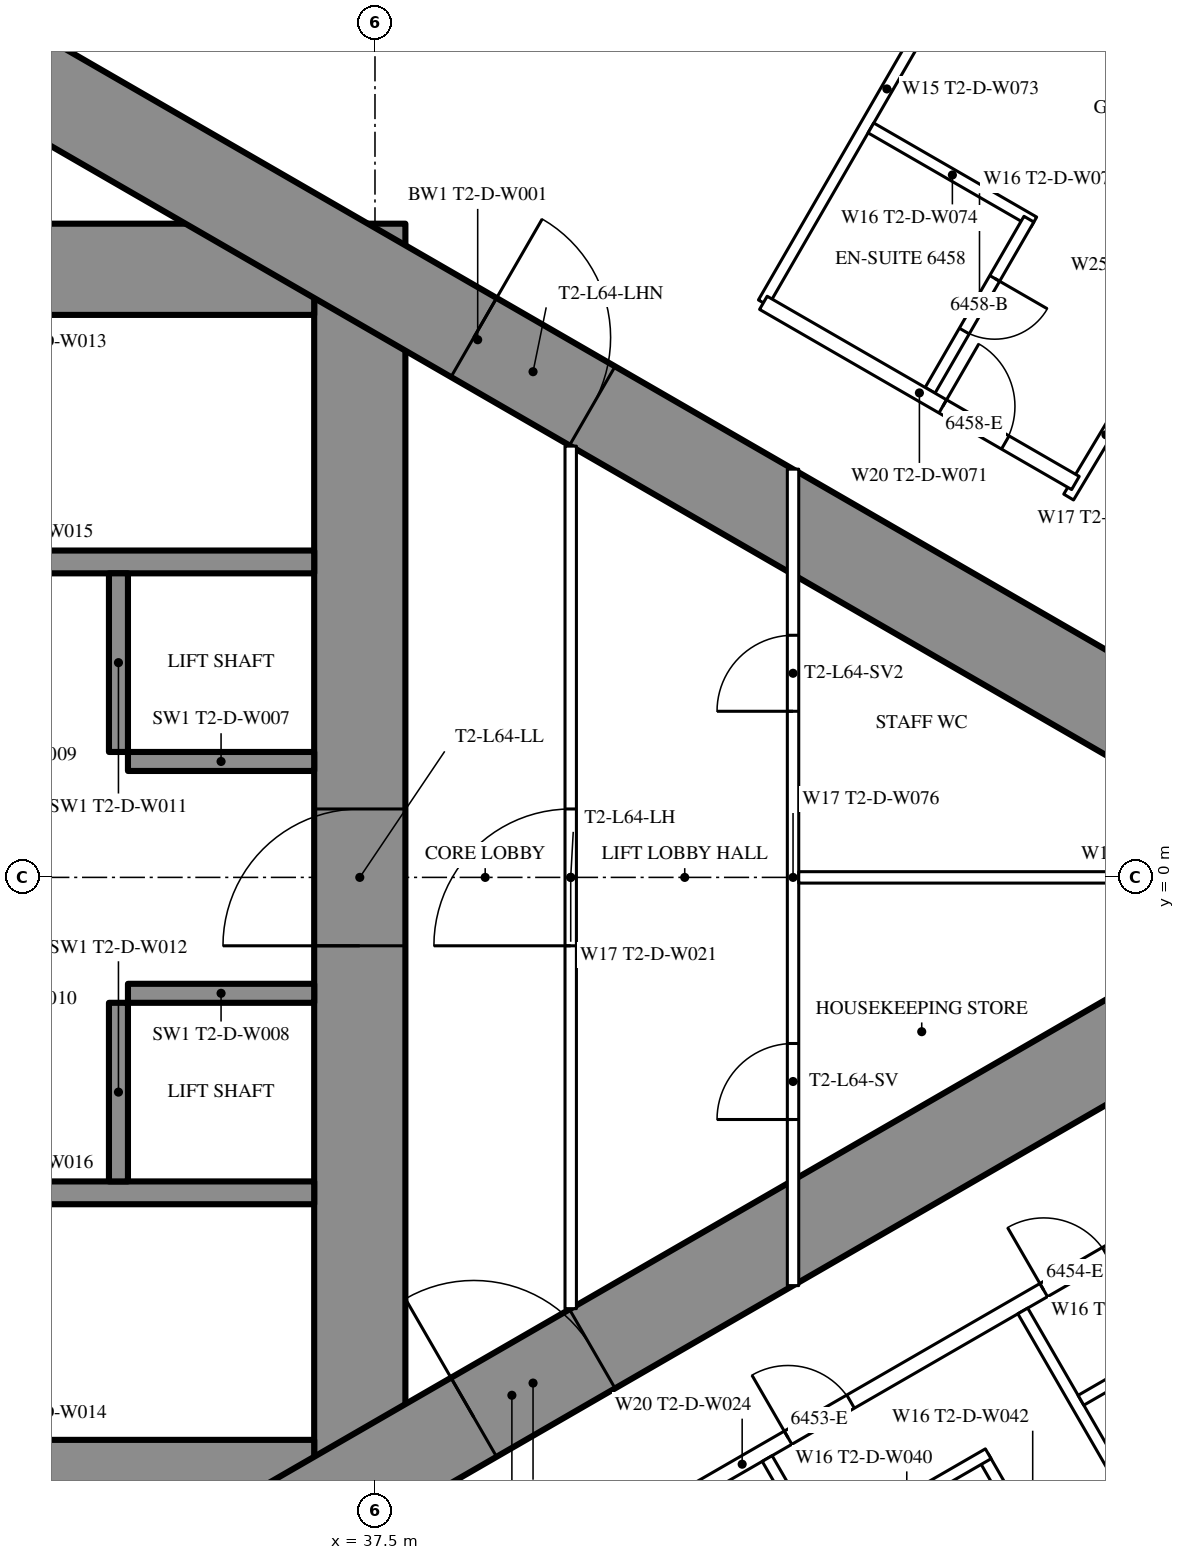
"""IFC4 building model, lengths in metres.
Left out: names, types, materials, properties, quantities, classifications, styles, units other than length and angle.
Written with IfcOpenShell. Run it as: python <this file> out.ifc"""

import sys

from ifc_helpers import new_model, si_unit, direction, frame, frame_2d, origin, place, context, subcontext, project, spatial, rectangle, extrude, element, fill, save


model = new_model("IFC4")
c1 = context("Model", 3, precision=1e-05, world=origin(), true_north=direction((0.0, 1.0)))
c2 = subcontext(c1, "Body", "Model", "MODEL_VIEW")
j1 = project(units=[si_unit("LENGTHUNIT", "METRE"), si_unit("PLANEANGLEUNIT", "RADIAN")], contexts=[c1])
p1 = place(None, origin())
s1 = spatial("IfcSite", under=j1, at=p1, CompositionType="ELEMENT")
p2 = place(p1, origin())
s2 = spatial("IfcBuilding", under=s1, at=p2, CompositionType="ELEMENT")
p3 = place(p2, frame((0.0, 0.0, 240.5)))
s3 = spatial("IfcBuildingStorey", under=s2, at=p3, CompositionType="ELEMENT", Elevation=240.5)
p4 = place(p3, frame((37.3, -8.6, 0.0), z_axis=(0.0, 0.0, 1.0), x_axis=(0.0, 1.0, 0.0)))
e1 = element("IfcWall", 1, at=p4, inside=s3, PredefinedType="SHEAR", context=c2, shape_type="SweptSolid", body=[
    extrude(rectangle(XDim=17.2, YDim=1.2, at=frame_2d((8.6, 0.0))), origin(), (0.0, 0.0, 1.0), 3.6),
])
p5 = place(p4, frame((7.7, 0.0, 0.0)))
e2 = element("IfcOpeningElement", 2, at=p5, cuts=e1, PredefinedType="OPENING", context=c2, shape_type="SweptSolid", body=[
    extrude(rectangle(XDim=1.8, YDim=2.2, at=frame_2d((0.9, 1.1))), frame((0.0, 0.61, 0.0), z_axis=(0.0, -1.0, 0.0), x_axis=(1.0, 0.0, 0.0)), (0.0, 0.0, 1.0), 1.22),
])
p6 = place(p3, frame((28.3, -8.0, 0.0), z_axis=(0.0, 0.0, 1.0), x_axis=(1.0, 0.0, 0.0)))
e3 = element("IfcWall", 3, at=p6, inside=s3, PredefinedType="SHEAR", context=c2, shape_type="SweptSolid", body=[
    extrude(rectangle(XDim=8.4, YDim=1.2, at=frame_2d((4.2, 0.0))), origin(), (0.0, 0.0, 1.0), 3.6),
])
p7 = place(p6, frame((0.25, 0.0, 0.0)))
e4 = element("IfcOpeningElement", 4, at=p7, cuts=e3, PredefinedType="OPENING", context=c2, shape_type="SweptSolid", body=[
    extrude(rectangle(XDim=1.0, YDim=2.2, at=frame_2d((0.5, 1.1))), frame((0.0, 0.61, 0.0), z_axis=(0.0, -1.0, 0.0), x_axis=(1.0, 0.0, 0.0)), (0.0, 0.0, 1.0), 1.22),
])
p8 = place(p3, frame((28.3, 8.0, 0.0), z_axis=(0.0, 0.0, 1.0), x_axis=(1.0, 0.0, 0.0)))
e5 = element("IfcWall", 5, at=p8, inside=s3, PredefinedType="SHEAR", context=c2, shape_type="SweptSolid", body=[
    extrude(rectangle(XDim=8.4, YDim=1.2, at=frame_2d((4.2, 0.0))), origin(), (0.0, 0.0, 1.0), 3.6),
])
p9 = place(p8, frame((0.25, 0.0, 0.0)))
e6 = element("IfcOpeningElement", 6, at=p9, cuts=e5, PredefinedType="OPENING", context=c2, shape_type="SweptSolid", body=[
    extrude(rectangle(XDim=1.0, YDim=2.2, at=frame_2d((0.5, 1.1))), frame((0.0, 0.61, 0.0), z_axis=(0.0, -1.0, 0.0), x_axis=(1.0, 0.0, 0.0)), (0.0, 0.0, 1.0), 1.22),
])
for number, where, z_axis, x_axis in (
    (7, (28.3, -4.15, 0.0), (0.0, 0.0, 1.0), (1.0, 0.0, 0.0)),
    (8, (28.3, 4.15, 0.0), (0.0, 0.0, 1.0), (1.0, 0.0, 0.0)),
):
    element("IfcWall", number, at=place(p3, frame(where, z_axis=z_axis, x_axis=x_axis)), inside=s3, PredefinedType="SHEAR", context=c2, shape_type="SweptSolid", body=[
        extrude(rectangle(XDim=8.4, YDim=0.3, at=frame_2d((4.2, 0.0))), origin(), (0.0, 0.0, 1.0), 3.6),
    ])
p10 = place(p3, frame((34.125, -4.0, 0.0), z_axis=(0.0, 0.0, 1.0), x_axis=(0.0, 1.0, 0.0)))
e9 = element("IfcWall", 9, at=p10, inside=s3, PredefinedType="SHEAR", context=c2, shape_type="SweptSolid", body=[
    extrude(rectangle(XDim=2.35, YDim=0.25, at=frame_2d((1.175, 0.0))), origin(), (0.0, 0.0, 1.0), 3.6),
])
p11 = place(p3, frame((34.25, -1.525, 0.0), z_axis=(0.0, 0.0, 1.0), x_axis=(1.0, 0.0, 0.0)))
e10 = element("IfcWall", 10, at=p11, inside=s3, PredefinedType="SHEAR", context=c2, shape_type="SweptSolid", body=[
    extrude(rectangle(XDim=2.45, YDim=0.25, at=frame_2d((1.225, 0.0))), origin(), (0.0, 0.0, 1.0), 3.6),
])
p12 = place(p3, frame((34.125, 1.65, 0.0), z_axis=(0.0, 0.0, 1.0), x_axis=(0.0, 1.0, 0.0)))
e11 = element("IfcWall", 11, at=p12, inside=s3, PredefinedType="SHEAR", context=c2, shape_type="SweptSolid", body=[
    extrude(rectangle(XDim=2.35, YDim=0.25, at=frame_2d((1.175, 0.0))), origin(), (0.0, 0.0, 1.0), 3.6),
])
p13 = place(p3, frame((34.25, 1.525, 0.0), z_axis=(0.0, 0.0, 1.0), x_axis=(1.0, 0.0, 0.0)))
e12 = element("IfcWall", 12, at=p13, inside=s3, PredefinedType="SHEAR", context=c2, shape_type="SweptSolid", body=[
    extrude(rectangle(XDim=2.45, YDim=0.25, at=frame_2d((1.225, 0.0))), origin(), (0.0, 0.0, 1.0), 3.6),
])
p14 = place(p3, frame((27.2, -13.8, 0.0), z_axis=(0.0, 0.0, 1.0), x_axis=(0.866027159892, 0.499996958321, 0.0)))
e13 = element("IfcWall", 13, at=p14, inside=s3, PredefinedType="SHEAR", context=c2, shape_type="SweptSolid", body=[
    extrude(rectangle(XDim=27.947, YDim=1.2, at=frame_2d((13.973, 0.0))), origin(), (0.0, 0.0, 1.0), 3.6),
])
p15 = place(p14, frame((4.6, 0.0, 0.0)))
e14 = element("IfcOpeningElement", 14, at=p15, cuts=e13, PredefinedType="OPENING", context=c2, shape_type="SweptSolid", body=[
    extrude(rectangle(XDim=1.0, YDim=2.2, at=frame_2d((0.5, 1.1))), frame((0.0, 0.61, 0.0), z_axis=(0.0, -1.0, 0.0), x_axis=(1.0, 0.0, 0.0)), (0.0, 0.0, 1.0), 1.22),
])
p16 = place(p14, frame((13.395, 0.0, 0.0)))
e15 = element("IfcOpeningElement", 15, at=p16, cuts=e13, PredefinedType="OPENING", context=c2, shape_type="SweptSolid", body=[
    extrude(rectangle(XDim=1.8, YDim=2.2, at=frame_2d((0.9, 1.1))), frame((0.0, 0.61, 0.0), z_axis=(0.0, -1.0, 0.0), x_axis=(1.0, 0.0, 0.0)), (0.0, 0.0, 1.0), 1.22),
])
p17 = place(p3, frame((27.2, 13.8, 0.0), z_axis=(0.0, 0.0, 1.0), x_axis=(0.866024515034, -0.500001539357, 0.0)))
e16 = element("IfcWall", 16, at=p17, inside=s3, PredefinedType="SHEAR", context=c2, shape_type="SweptSolid", body=[
    extrude(rectangle(XDim=26.907, YDim=1.2, at=frame_2d((13.454, 0.0))), origin(), (0.0, 0.0, 1.0), 3.6),
])
p18 = place(p17, frame((4.6, 0.0, 0.0)))
e17 = element("IfcOpeningElement", 17, at=p18, cuts=e16, PredefinedType="OPENING", context=c2, shape_type="SweptSolid", body=[
    extrude(rectangle(XDim=1.0, YDim=2.2, at=frame_2d((0.5, 1.1))), frame((0.0, 0.61, 0.0), z_axis=(0.0, -1.0, 0.0), x_axis=(1.0, 0.0, 0.0)), (0.0, 0.0, 1.0), 1.22),
])
p19 = place(p17, frame((13.395, 0.0, 0.0)))
e18 = element("IfcOpeningElement", 18, at=p19, cuts=e16, PredefinedType="OPENING", context=c2, shape_type="SweptSolid", body=[
    extrude(rectangle(XDim=1.8, YDim=2.2, at=frame_2d((0.9, 1.1))), frame((0.0, 0.61, 0.0), z_axis=(0.0, -1.0, 0.0), x_axis=(1.0, 0.0, 0.0)), (0.0, 0.0, 1.0), 1.22),
])
p20 = place(p3, frame((28.959, -15.44, 0.0), z_axis=(0.0, 0.0, 1.0), x_axis=(0.866025227435, 0.500000305447, 0.0)))
e19 = element("IfcWall", 19, at=p20, inside=s3, PredefinedType="PARTITIONING", context=c2, shape_type="SweptSolid", body=[
    extrude(rectangle(XDim=30.88, YDim=0.2, at=frame_2d((15.44, 0.0))), origin(), (0.0, 0.0, 1.0), 3.35),
])
p21 = place(p20, frame((1.494, 0.0, 0.0)))
e20 = element("IfcOpeningElement", 20, at=p21, cuts=e19, PredefinedType="OPENING", context=c2, shape_type="SweptSolid", body=[
    extrude(rectangle(XDim=1.8, YDim=2.03, at=frame_2d((0.9, 1.015))), frame((0.0, 0.11, 0.0), z_axis=(0.0, -1.0, 0.0), x_axis=(1.0, 0.0, 0.0)), (0.0, 0.0, 1.0), 0.22),
])
p22 = place(p20, frame((7.687, 0.0, 0.0)))
e21 = element("IfcOpeningElement", 21, at=p22, cuts=e19, PredefinedType="OPENING", context=c2, shape_type="SweptSolid", body=[
    extrude(rectangle(XDim=1.0, YDim=2.2, at=frame_2d((0.5, 1.1))), frame((0.0, 0.11, 0.0), z_axis=(0.0, -1.0, 0.0), x_axis=(1.0, 0.0, 0.0)), (0.0, 0.0, 1.0), 0.22),
])
p23 = place(p20, frame((16.137, 0.0, 0.0)))
e22 = element("IfcOpeningElement", 22, at=p23, cuts=e19, PredefinedType="OPENING", context=c2, shape_type="SweptSolid", body=[
    extrude(rectangle(XDim=0.95, YDim=2.2, at=frame_2d((0.475, 1.1))), frame((0.0, 0.11, 0.0), z_axis=(0.0, -1.0, 0.0), x_axis=(1.0, 0.0, 0.0)), (0.0, 0.0, 1.0), 0.22),
])
p24 = place(p20, frame((20.021, 0.0, 0.0)))
e23 = element("IfcOpeningElement", 23, at=p24, cuts=e19, PredefinedType="OPENING", context=c2, shape_type="SweptSolid", body=[
    extrude(rectangle(XDim=0.95, YDim=2.2, at=frame_2d((0.475, 1.1))), frame((0.0, 0.11, 0.0), z_axis=(0.0, -1.0, 0.0), x_axis=(1.0, 0.0, 0.0)), (0.0, 0.0, 1.0), 0.22),
])
p25 = place(p20, frame((26.253, 0.0, 0.0)))
e24 = element("IfcOpeningElement", 24, at=p25, cuts=e19, PredefinedType="OPENING", context=c2, shape_type="SweptSolid", body=[
    extrude(rectangle(XDim=0.95, YDim=2.2, at=frame_2d((0.475, 1.1))), frame((0.0, 0.11, 0.0), z_axis=(0.0, -1.0, 0.0), x_axis=(1.0, 0.0, 0.0)), (0.0, 0.0, 1.0), 0.22),
])
p26 = place(p3, frame((42.66, -7.646, 0.0), z_axis=(0.0, 0.0, 1.0), x_axis=(0.499996592859, -0.866027370889, 0.0)))
e25 = element("IfcWall", 25, at=p26, inside=s3, PredefinedType="PARTITIONING", context=c2, shape_type="SweptSolid", body=[
    extrude(rectangle(XDim=6.398, YDim=0.15, at=frame_2d((3.199, 0.0))), origin(), (0.0, 0.0, 1.0), 2.45),
])
p27 = place(p3, frame((46.023, -5.704, 0.0), z_axis=(0.0, 0.0, 1.0), x_axis=(0.499984478165, -0.866034365135, 0.0)))
e26 = element("IfcWall", 26, at=p27, inside=s3, PredefinedType="PARTITIONING", context=c2, shape_type="SweptSolid", body=[
    extrude(rectangle(XDim=6.426, YDim=0.15, at=frame_2d((3.213, 0.0))), origin(), (0.0, 0.0, 1.0), 2.45),
])
p28 = place(p3, frame((42.61, 7.559, 0.0), z_axis=(0.0, 0.0, 1.0), x_axis=(0.500014058812, 0.866017286774, 0.0)))
e27 = element("IfcWall", 27, at=p28, inside=s3, PredefinedType="PARTITIONING", context=c2, shape_type="SweptSolid", body=[
    extrude(rectangle(XDim=6.498, YDim=0.15, at=frame_2d((3.249, 0.0))), origin(), (0.0, 0.0, 1.0), 2.45),
])
p29 = place(p3, frame((47.606, 6.642, 0.0), z_axis=(0.0, 0.0, 1.0), x_axis=(-0.51353662755, -0.858067673418, 0.0)))
e28 = element("IfcWall", 28, at=p29, inside=s3, PredefinedType="PARTITIONING", context=c2, shape_type="SweptSolid", body=[
    extrude(rectangle(XDim=1.91, YDim=0.15, at=frame_2d((0.955, 0.0))), origin(), (0.0, 0.0, 1.0), 3.35),
])
p30 = place(p3, frame((45.503, -7.621, 0.0), z_axis=(0.0, 0.0, 1.0), x_axis=(0.500006934395, -0.866021400173, 0.0)))
e29 = element("IfcWall", 29, at=p30, inside=s3, PredefinedType="PARTITIONING", context=c2, shape_type="SweptSolid", body=[
    extrude(rectangle(XDim=2.6, YDim=0.15, at=frame_2d((1.3, 0.0))), origin(), (0.0, 0.0, 1.0), 3.35),
])
p31 = place(p30, frame((0.9, 0.0, 0.0)))
e30 = element("IfcOpeningElement", 30, at=p31, cuts=e29, PredefinedType="OPENING", context=c2, shape_type="SweptSolid", body=[
    extrude(rectangle(XDim=0.8, YDim=2.2, at=frame_2d((0.4, 1.1))), frame((0.0, 0.085, 0.0), z_axis=(0.0, -1.0, 0.0), x_axis=(1.0, 0.0, 0.0)), (0.0, 0.0, 1.0), 0.17),
])
for number, where, z_axis, x_axis in (
    (31, (43.425, -8.821, 0.0), (0.0, 0.0, 1.0), (0.866, 0.5, 0.0)),
    (32, (46.788, -6.879, 0.0), (0.0, 0.0, 1.0), (0.866, 0.5, 0.0)),
    (33, (44.025, 9.86, 0.0), (0.0, 0.0, 1.0), (0.866, -0.5, 0.0)),
):
    element("IfcWall", number, at=place(p3, frame(where, z_axis=z_axis, x_axis=x_axis)), inside=s3, PredefinedType="PARTITIONING", context=c2, shape_type="SweptSolid", body=[
        extrude(rectangle(XDim=2.475, YDim=0.15, at=frame_2d((1.237, 0.0))), origin(), (0.0, 0.0, 1.0), 3.35),
    ])
p32 = place(p3, frame((44.803, 6.408, 0.0), z_axis=(0.0, 0.0, 1.0), x_axis=(0.500047596559, 0.865997922154, 0.0)))
e34 = element("IfcWall", 34, at=p32, inside=s3, PredefinedType="PARTITIONING", context=c2, shape_type="SweptSolid", body=[
    extrude(rectangle(XDim=2.6, YDim=0.15, at=frame_2d((1.3, 0.0))), origin(), (0.0, 0.0, 1.0), 3.35),
])
p33 = place(p32, frame((0.9, 0.0, 0.0)))
e35 = element("IfcOpeningElement", 35, at=p33, cuts=e34, PredefinedType="OPENING", context=c2, shape_type="SweptSolid", body=[
    extrude(rectangle(XDim=0.8, YDim=2.2, at=frame_2d((0.4, 1.1))), frame((0.0, 0.085, 0.0), z_axis=(0.0, -1.0, 0.0), x_axis=(1.0, 0.0, 0.0)), (0.0, 0.0, 1.0), 0.17),
])
p34 = place(p3, frame((42.61, 7.559, 0.0), z_axis=(0.0, 0.0, 1.0), x_axis=(0.866032081755, -0.499988433238, 0.0)))
e36 = element("IfcWall", 36, at=p34, inside=s3, PredefinedType="PARTITIONING", context=c2, shape_type="SweptSolid", body=[
    extrude(rectangle(XDim=4.741, YDim=0.2, at=frame_2d((2.37, 0.0))), origin(), (0.0, 0.0, 1.0), 3.35),
])
p35 = place(p34, frame((2.725, 0.0, 0.0)))
e37 = element("IfcOpeningElement", 37, at=p35, cuts=e36, PredefinedType="OPENING", context=c2, shape_type="SweptSolid", body=[
    extrude(rectangle(XDim=0.95, YDim=2.2, at=frame_2d((0.475, 1.1))), frame((0.0, 0.11, 0.0), z_axis=(0.0, -1.0, 0.0), x_axis=(1.0, 0.0, 0.0)), (0.0, 0.0, 1.0), 0.22),
])
p36 = place(p3, frame((40.075, -5.674, 0.0), z_axis=(0.0, 0.0, 1.0), x_axis=(0.0, 1.0, 0.0)))
e38 = element("IfcWall", 38, at=p36, inside=s3, PredefinedType="PARTITIONING", context=c2, shape_type="SweptSolid", body=[
    extrude(rectangle(XDim=11.348, YDim=0.15, at=frame_2d((5.674, 0.0))), origin(), (0.0, 0.0, 1.0), 3.35),
])
p37 = place(p36, frame((4.774, 0.0, 0.0)))
e39 = element("IfcOpeningElement", 39, at=p37, cuts=e38, PredefinedType="OPENING", context=c2, shape_type="SweptSolid", body=[
    extrude(rectangle(XDim=1.8, YDim=2.2, at=frame_2d((0.9, 1.1))), frame((0.0, 0.085, 0.0), z_axis=(0.0, -1.0, 0.0), x_axis=(1.0, 0.0, 0.0)), (0.0, 0.0, 1.0), 0.17),
])
p38 = place(p3, frame((43.0, -5.371, 0.0), z_axis=(0.0, 0.0, 1.0), x_axis=(0.0, 1.0, 0.0)))
e40 = element("IfcWall", 40, at=p38, inside=s3, PredefinedType="PARTITIONING", context=c2, shape_type="SweptSolid", body=[
    extrude(rectangle(XDim=10.741, YDim=0.15, at=frame_2d((5.371, 0.0))), origin(), (0.0, 0.0, 1.0), 3.35),
])
p39 = place(p38, frame((2.185, 0.0, 0.0)))
e41 = element("IfcOpeningElement", 41, at=p39, cuts=e40, PredefinedType="OPENING", context=c2, shape_type="SweptSolid", body=[
    extrude(rectangle(XDim=1.0, YDim=2.2, at=frame_2d((0.5, 1.1))), frame((0.0, 0.085, 0.0), z_axis=(0.0, -1.0, 0.0), x_axis=(1.0, 0.0, 0.0)), (0.0, 0.0, 1.0), 0.17),
])
p40 = place(p38, frame((7.556, 0.0, 0.0)))
e42 = element("IfcOpeningElement", 42, at=p40, cuts=e40, PredefinedType="OPENING", context=c2, shape_type="SweptSolid", body=[
    extrude(rectangle(XDim=1.0, YDim=2.2, at=frame_2d((0.5, 1.1))), frame((0.0, 0.085, 0.0), z_axis=(0.0, -1.0, 0.0), x_axis=(1.0, 0.0, 0.0)), (0.0, 0.0, 1.0), 0.17),
])
p41 = place(p3, frame((43.075, 0.0, 0.0), z_axis=(0.0, 0.0, 1.0), x_axis=(1.0, 0.0, 0.0)))
e43 = element("IfcWall", 43, at=p41, inside=s3, PredefinedType="PARTITIONING", context=c2, shape_type="SweptSolid", body=[
    extrude(rectangle(XDim=9.227, YDim=0.15, at=frame_2d((4.614, 0.0))), origin(), (0.0, 0.0, 1.0), 2.45),
])
p42 = place(p23, origin())
e44 = element("IfcDoor", 44, at=p42, inside=s3, OperationType="SINGLE_SWING_LEFT", PredefinedType="DOOR", context=c2, shape_type="SweptSolid", body=[
    extrude(rectangle(XDim=0.95, YDim=2.2, at=frame_2d((0.475, 1.1))), frame((0.0, 0.025, 0.0), z_axis=(0.0, -1.0, 0.0), x_axis=(1.0, 0.0, 0.0)), (0.0, 0.0, 1.0), 0.05),
])
fill(e22, e44)
p43 = place(p24, origin())
e45 = element("IfcDoor", 45, at=p43, inside=s3, OperationType="SINGLE_SWING_LEFT", PredefinedType="DOOR", context=c2, shape_type="SweptSolid", body=[
    extrude(rectangle(XDim=0.95, YDim=2.2, at=frame_2d((0.475, 1.1))), frame((0.0, 0.025, 0.0), z_axis=(0.0, -1.0, 0.0), x_axis=(1.0, 0.0, 0.0)), (0.0, 0.0, 1.0), 0.05),
])
fill(e23, e45)
p44 = place(p33, origin())
e46 = element("IfcDoor", 46, at=p44, inside=s3, OperationType="SINGLE_SWING_RIGHT", PredefinedType="DOOR", context=c2, shape_type="SweptSolid", body=[
    extrude(rectangle(XDim=0.8, YDim=2.2, at=frame_2d((0.4, 1.1))), frame((0.0, 0.025, 0.0), z_axis=(0.0, -1.0, 0.0), x_axis=(1.0, 0.0, 0.0)), (0.0, 0.0, 1.0), 0.05),
])
fill(e35, e46)
p45 = place(p35, origin())
e47 = element("IfcDoor", 47, at=p45, inside=s3, OperationType="SINGLE_SWING_LEFT", PredefinedType="DOOR", context=c2, shape_type="SweptSolid", body=[
    extrude(rectangle(XDim=0.95, YDim=2.2, at=frame_2d((0.475, 1.1))), frame((0.0, 0.025, 0.0), z_axis=(0.0, -1.0, 0.0), x_axis=(1.0, 0.0, 0.0)), (0.0, 0.0, 1.0), 0.05),
])
fill(e37, e47)
p46 = place(p37, origin())
e48 = element("IfcDoor", 48, at=p46, inside=s3, OperationType="DOUBLE_DOOR_SINGLE_SWING", PredefinedType="DOOR", context=c2, shape_type="SweptSolid", body=[
    extrude(rectangle(XDim=1.8, YDim=2.2, at=frame_2d((0.9, 1.1))), frame((0.0, 0.025, 0.0), z_axis=(0.0, -1.0, 0.0), x_axis=(1.0, 0.0, 0.0)), (0.0, 0.0, 1.0), 0.05),
])
fill(e39, e48)
p47 = place(p39, origin())
e49 = element("IfcDoor", 49, at=p47, inside=s3, OperationType="SINGLE_SWING_LEFT", PredefinedType="DOOR", context=c2, shape_type="SweptSolid", body=[
    extrude(rectangle(XDim=1.0, YDim=2.2, at=frame_2d((0.5, 1.1))), frame((0.0, 0.025, 0.0), z_axis=(0.0, -1.0, 0.0), x_axis=(1.0, 0.0, 0.0)), (0.0, 0.0, 1.0), 0.05),
])
fill(e41, e49)
p48 = place(p40, origin())
e50 = element("IfcDoor", 50, at=p48, inside=s3, OperationType="SINGLE_SWING_LEFT", PredefinedType="DOOR", context=c2, shape_type="SweptSolid", body=[
    extrude(rectangle(XDim=1.0, YDim=2.2, at=frame_2d((0.5, 1.1))), frame((0.0, 0.025, 0.0), z_axis=(0.0, -1.0, 0.0), x_axis=(1.0, 0.0, 0.0)), (0.0, 0.0, 1.0), 0.05),
])
fill(e42, e50)
p49 = place(p16, origin())
e51 = element("IfcDoor", 51, at=p49, inside=s3, OperationType="DOUBLE_DOOR_SINGLE_SWING", PredefinedType="DOOR", context=c2, shape_type="SweptSolid", body=[
    extrude(rectangle(XDim=1.8, YDim=2.2, at=frame_2d((0.9, 1.1))), frame((0.0, 0.025, 0.0), z_axis=(0.0, -1.0, 0.0), x_axis=(1.0, 0.0, 0.0)), (0.0, 0.0, 1.0), 0.05),
])
fill(e15, e51)
p50 = place(p19, origin())
e52 = element("IfcDoor", 52, at=p50, inside=s3, OperationType="DOUBLE_DOOR_SINGLE_SWING", PredefinedType="DOOR", context=c2, shape_type="SweptSolid", body=[
    extrude(rectangle(XDim=1.8, YDim=2.2, at=frame_2d((0.9, 1.1))), frame((0.0, 0.025, 0.0), z_axis=(0.0, -1.0, 0.0), x_axis=(1.0, 0.0, 0.0)), (0.0, 0.0, 1.0), 0.05),
])
fill(e18, e52)
p51 = place(p5, origin())
e53 = element("IfcDoor", 53, at=p51, inside=s3, OperationType="DOUBLE_DOOR_SINGLE_SWING", PredefinedType="DOOR", context=c2, shape_type="SweptSolid", body=[
    extrude(rectangle(XDim=1.8, YDim=2.2, at=frame_2d((0.9, 1.1))), frame((0.0, 0.025, 0.0), z_axis=(0.0, -1.0, 0.0), x_axis=(1.0, 0.0, 0.0)), (0.0, 0.0, 1.0), 0.05),
])
fill(e2, e53)
save(model, sys.argv[1])
